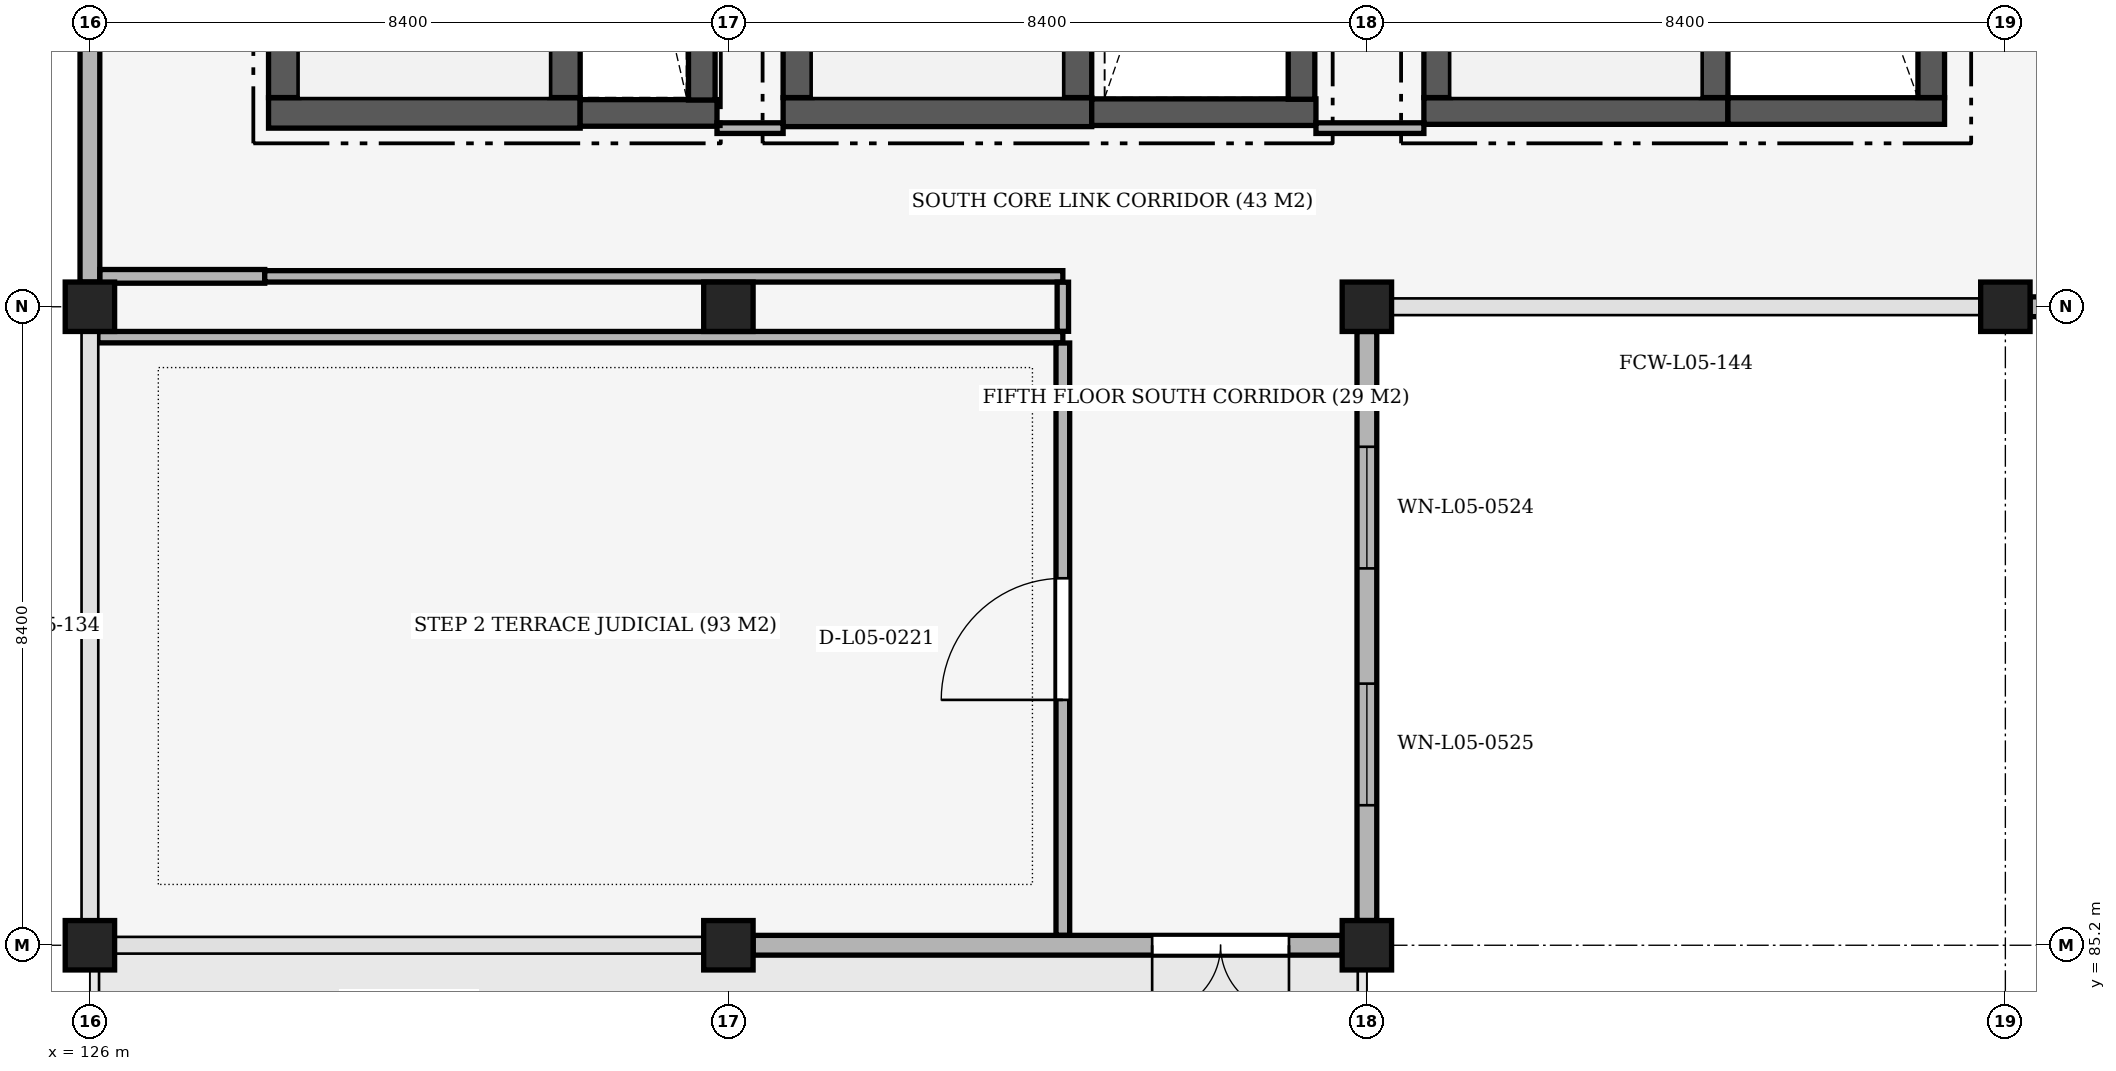
"""IFC4 building model, lengths in metres.
Left out: names, types, materials, properties, quantities, classifications, styles, units other than length and angle.
Written with IfcOpenShell. Run it as: python <this file> out.ifc"""

import sys

from ifc_helpers import new_model, si_unit, direction, frame, frame_2d, origin, origin_2d, place, context, subcontext, project, spatial, rectangle, extrude, element, fill, save


model = new_model("IFC4")
c1 = context("Model", 3, precision=1e-05, world=origin(), true_north=direction((0.0, 1.0)))
c2 = subcontext(c1, "Body", "Model", "MODEL_VIEW")
j1 = project(units=[si_unit("LENGTHUNIT", "METRE"), si_unit("PLANEANGLEUNIT", "RADIAN")], contexts=[c1])
p1 = place(None, origin())
s1 = spatial("IfcSite", under=j1, at=p1, CompositionType="ELEMENT")
p2 = place(p1, origin())
s2 = spatial("IfcBuilding", under=s1, at=p2, CompositionType="ELEMENT")
p3 = place(p2, frame((0.0, 0.0, 25.2)))
s3 = spatial("IfcBuildingStorey", under=s2, at=p3, CompositionType="ELEMENT", Elevation=25.2)
for number, where, z_axis, x_axis in (
    (1, (126.0, 85.2, 0.0), (0.0, 0.0, 1.0), (1.0, 0.0, 0.0)),
    (2, (126.0, 93.6, 0.0), (0.0, 0.0, 1.0), (1.0, 0.0, 0.0)),
    (3, (134.4, 85.2, 0.0), (0.0, 0.0, 1.0), (1.0, 0.0, 0.0)),
    (4, (134.4, 93.6, 0.0), (0.0, 0.0, 1.0), (1.0, 0.0, 0.0)),
    (5, (142.8, 85.2, 0.0), (0.0, 0.0, 1.0), (1.0, 0.0, 0.0)),
    (6, (142.8, 93.6, 0.0), (0.0, 0.0, 1.0), (1.0, 0.0, 0.0)),
    (7, (151.2, 93.6, 0.0), (0.0, 0.0, 1.0), (1.0, 0.0, 0.0)),
):
    element("IfcColumn", number, at=place(p3, frame(where, z_axis=z_axis, x_axis=x_axis)), inside=s3, PredefinedType="COLUMN", context=c2, shape_type="SweptSolid", body=[
        extrude(rectangle(XDim=0.65, YDim=0.65, at=origin_2d()), origin(), (0.0, 0.0, 1.0), 4.2),
    ])
p4 = place(p3, frame((142.475, 85.2, 0.0), z_axis=(0.0, 0.0, 1.0), x_axis=(-1.0, 0.0, 0.0)))
e8 = element("IfcWall", 8, at=p4, inside=s3, PredefinedType="SOLIDWALL", context=c2, shape_type="SweptSolid", body=[
    extrude(rectangle(XDim=7.75, YDim=0.26, at=frame_2d((3.875, 0.0))), origin(), (0.0, 0.0, 1.0), 3.25),
])
p5 = place(p4, frame((0.7, 0.0, 0.0)))
e9 = element("IfcOpeningElement", 9, at=p5, cuts=e8, PredefinedType="OPENING", context=c2, shape_type="SweptSolid", body=[
    extrude(rectangle(XDim=1.8, YDim=2.2, at=frame_2d((0.9, 1.1))), frame((0.0, 0.145, 0.0), z_axis=(0.0, -1.0, 0.0), x_axis=(1.0, 0.0, 0.0)), (0.0, 0.0, 1.0), 0.29),
])
p6 = place(p3, frame((126.0, 93.925, 0.0), z_axis=(0.0, 0.0, 1.0), x_axis=(0.0, 1.0, 0.0)))
e10 = element("IfcWall", 10, at=p6, inside=s3, PredefinedType="SOLIDWALL", context=c2, shape_type="SweptSolid", body=[
    extrude(rectangle(XDim=5.325, YDim=0.26, at=frame_2d((2.663, 0.0))), origin(), (0.0, 0.0, 1.0), 3.4),
])
p7 = place(p3, frame((156.275, 93.6, 0.0), z_axis=(0.0, 0.0, 1.0), x_axis=(-1.0, 0.0, 0.0)))
e11 = element("IfcWall", 11, at=p7, inside=s3, PredefinedType="SOLIDWALL", context=c2, shape_type="SweptSolid", body=[
    extrude(rectangle(XDim=4.75, YDim=0.26, at=frame_2d((2.375, 0.0))), origin(), (0.0, 0.0, 1.0), 3.35),
])
p8 = place(p3, frame((142.8, 93.275, 0.0), z_axis=(0.0, 0.0, 1.0), x_axis=(0.0, -1.0, 0.0)))
e12 = element("IfcWall", 12, at=p8, inside=s3, PredefinedType="SOLIDWALL", context=c2, shape_type="SweptSolid", body=[
    extrude(rectangle(XDim=7.75, YDim=0.26, at=frame_2d((3.875, 0.0))), origin(), (0.0, 0.0, 1.0), 3.25),
])
p9 = place(p8, frame((1.517, 0.0, 1.05)))
e13 = element("IfcOpeningElement", 13, at=p9, cuts=e12, PredefinedType="OPENING", context=c2, shape_type="SweptSolid", body=[
    extrude(rectangle(XDim=1.6, YDim=1.8, at=frame_2d((0.8, 0.9))), frame((0.0, 0.145, 0.0), z_axis=(0.0, -1.0, 0.0), x_axis=(1.0, 0.0, 0.0)), (0.0, 0.0, 1.0), 0.29),
])
p10 = place(p8, frame((4.633, 0.0, 1.05)))
e14 = element("IfcOpeningElement", 14, at=p10, cuts=e12, PredefinedType="OPENING", context=c2, shape_type="SweptSolid", body=[
    extrude(rectangle(XDim=1.6, YDim=1.8, at=frame_2d((0.8, 0.9))), frame((0.0, 0.145, 0.0), z_axis=(0.0, -1.0, 0.0), x_axis=(1.0, 0.0, 0.0)), (0.0, 0.0, 1.0), 0.29),
])
p11 = place(p3, frame((128.35, 96.15, 0.0), z_axis=(0.0, 0.0, 1.0), x_axis=(1.0, 0.0, 0.0)))
e15 = element("IfcWall", 15, at=p11, inside=s3, PredefinedType="SHEAR", context=c2, shape_type="SweptSolid", body=[
    extrude(rectangle(XDim=4.1, YDim=0.4, at=frame_2d((2.05, 0.0))), origin(), (0.0, 0.0, 1.0), 3.95),
])
for number, where, z_axis, x_axis in (
    (16, (128.55, 96.352, 0.0), (0.0, 0.0, 1.0), (0.0, 1.0, 0.0)),
    (17, (132.25, 96.352, 0.0), (0.0, 0.0, 1.0), (0.0, 1.0, 0.0)),
):
    element("IfcWall", number, at=place(p3, frame(where, z_axis=z_axis, x_axis=x_axis)), inside=s3, PredefinedType="SHEAR", context=c2, shape_type="SweptSolid", body=[
        extrude(rectangle(XDim=6.896, YDim=0.4, at=frame_2d((3.448, 0.0))), origin(), (0.0, 0.0, 1.0), 3.95),
    ])
p12 = place(p3, frame((132.45, 96.15, 0.0), z_axis=(0.0, 0.0, 1.0), x_axis=(1.0, 0.0, 0.0)))
e18 = element("IfcWall", 18, at=p12, inside=s3, PredefinedType="SHEAR", context=c2, shape_type="SweptSolid", body=[
    extrude(rectangle(XDim=1.8, YDim=0.35, at=frame_2d((0.9, 0.0))), origin(), (0.0, 0.0, 1.0), 3.95),
])
p13 = place(p3, frame((134.05, 96.32, 0.0), z_axis=(0.0, 0.0, 1.0), x_axis=(0.0, 1.0, 0.0)))
e19 = element("IfcWall", 19, at=p13, inside=s3, PredefinedType="SHEAR", context=c2, shape_type="SweptSolid", body=[
    extrude(rectangle(XDim=7.187, YDim=0.35, at=frame_2d((3.594, 0.0))), origin(), (0.0, 0.0, 1.0), 3.95),
])
p14 = place(p3, frame((135.12, 96.16, 0.0), z_axis=(0.0, 0.0, 1.0), x_axis=(1.0, 0.0, 0.0)))
e20 = element("IfcWall", 20, at=p14, inside=s3, PredefinedType="SHEAR", context=c2, shape_type="SweptSolid", body=[
    extrude(rectangle(XDim=4.06, YDim=0.38, at=frame_2d((2.03, 0.0))), origin(), (0.0, 0.0, 1.0), 3.95),
])
for number, where, z_axis, x_axis in (
    (21, (135.31, 96.352, 0.0), (0.0, 0.0, 1.0), (0.0, 1.0, 0.0)),
    (22, (138.99, 96.352, 0.0), (0.0, 0.0, 1.0), (0.0, 1.0, 0.0)),
):
    element("IfcWall", number, at=place(p3, frame(where, z_axis=z_axis, x_axis=x_axis)), inside=s3, PredefinedType="SHEAR", context=c2, shape_type="SweptSolid", body=[
        extrude(rectangle(XDim=6.896, YDim=0.38, at=frame_2d((3.448, 0.0))), origin(), (0.0, 0.0, 1.0), 3.95),
    ])
p15 = place(p3, frame((139.18, 96.16, 0.0), z_axis=(0.0, 0.0, 1.0), x_axis=(1.0, 0.0, 0.0)))
e23 = element("IfcWall", 23, at=p15, inside=s3, PredefinedType="SHEAR", context=c2, shape_type="SweptSolid", body=[
    extrude(rectangle(XDim=2.95, YDim=0.35, at=frame_2d((1.475, 0.0))), origin(), (0.0, 0.0, 1.0), 3.95),
])
p16 = place(p3, frame((141.94, 96.33, 0.0), z_axis=(0.0, 0.0, 1.0), x_axis=(0.0, 1.0, 0.0)))
e24 = element("IfcWall", 24, at=p16, inside=s3, PredefinedType="SHEAR", context=c2, shape_type="SweptSolid", body=[
    extrude(rectangle(XDim=7.177, YDim=0.35, at=frame_2d((3.588, 0.0))), origin(), (0.0, 0.0, 1.0), 3.95),
])
p17 = place(p3, frame((143.55, 96.175, 0.0), z_axis=(0.0, 0.0, 1.0), x_axis=(1.0, 0.0, 0.0)))
e25 = element("IfcWall", 25, at=p17, inside=s3, PredefinedType="SHEAR", context=c2, shape_type="SweptSolid", body=[
    extrude(rectangle(XDim=4.0, YDim=0.35, at=frame_2d((2.0, 0.0))), origin(), (0.0, 0.0, 1.0), 3.95),
])
for number, where, z_axis, x_axis in (
    (26, (143.725, 96.352, 0.0), (0.0, 0.0, 1.0), (0.0, 1.0, 0.0)),
    (27, (147.375, 96.352, 0.0), (0.0, 0.0, 1.0), (0.0, 1.0, 0.0)),
):
    element("IfcWall", number, at=place(p3, frame(where, z_axis=z_axis, x_axis=x_axis)), inside=s3, PredefinedType="SHEAR", context=c2, shape_type="SweptSolid", body=[
        extrude(rectangle(XDim=6.896, YDim=0.35, at=frame_2d((3.448, 0.0))), origin(), (0.0, 0.0, 1.0), 3.95),
    ])
p18 = place(p3, frame((147.55, 96.175, 0.0), z_axis=(0.0, 0.0, 1.0), x_axis=(1.0, 0.0, 0.0)))
e28 = element("IfcWall", 28, at=p18, inside=s3, PredefinedType="SHEAR", context=c2, shape_type="SweptSolid", body=[
    extrude(rectangle(XDim=2.85, YDim=0.35, at=frame_2d((1.425, 0.0))), origin(), (0.0, 0.0, 1.0), 3.95),
])
p19 = place(p3, frame((150.225, 96.352, 0.0), z_axis=(0.0, 0.0, 1.0), x_axis=(0.0, 1.0, 0.0)))
e29 = element("IfcWall", 29, at=p19, inside=s3, PredefinedType="SHEAR", context=c2, shape_type="SweptSolid", body=[
    extrude(rectangle(XDim=7.155, YDim=0.35, at=frame_2d((3.578, 0.0))), origin(), (0.0, 0.0, 1.0), 3.95),
])
p20 = place(p3, frame((126.105, 93.2, 0.0), z_axis=(0.0, 0.0, 1.0), x_axis=(1.0, 0.0, 0.0)))
e30 = element("IfcWall", 30, at=p20, inside=s3, PredefinedType="PARTITIONING", context=c2, shape_type="SweptSolid", body=[
    extrude(rectangle(XDim=12.695, YDim=0.15, at=frame_2d((6.348, 0.0))), origin(), (0.0, 0.0, 1.0), 3.25),
])
p21 = place(p3, frame((126.132, 94.0, 0.0), z_axis=(0.0, 0.0, 1.0), x_axis=(1.0, 0.0, 0.0)))
e31 = element("IfcWall", 31, at=p21, inside=s3, PredefinedType="PARTITIONING", context=c2, shape_type="SweptSolid", body=[
    extrude(rectangle(XDim=2.168, YDim=0.18, at=frame_2d((1.084, 0.0))), origin(), (0.0, 0.0, 1.0), 3.4),
])
p22 = place(p3, frame((128.3, 94.0, 0.0), z_axis=(0.0, 0.0, 1.0), x_axis=(1.0, 0.0, 0.0)))
e32 = element("IfcWall", 32, at=p22, inside=s3, PredefinedType="PARTITIONING", context=c2, shape_type="SweptSolid", body=[
    extrude(rectangle(XDim=10.5, YDim=0.15, at=frame_2d((5.25, 0.0))), origin(), (0.0, 0.0, 1.0), 3.4),
])
p23 = place(p3, frame((134.25, 95.95, 0.0), z_axis=(0.0, 0.0, 1.0), x_axis=(1.0, 0.0, 0.0)))
e33 = element("IfcWall", 33, at=p23, inside=s3, PredefinedType="PARTITIONING", context=c2, shape_type="SweptSolid", body=[
    extrude(rectangle(XDim=0.87, YDim=0.14, at=frame_2d((0.435, 0.0))), origin(), (0.0, 0.0, 1.0), 3.4),
])
p24 = place(p3, frame((142.13, 95.95, 0.0), z_axis=(0.0, 0.0, 1.0), x_axis=(1.0, 0.0, 0.0)))
e34 = element("IfcWall", 34, at=p24, inside=s3, PredefinedType="PARTITIONING", context=c2, shape_type="SweptSolid", body=[
    extrude(rectangle(XDim=1.42, YDim=0.14, at=frame_2d((0.71, 0.0))), origin(), (0.0, 0.0, 1.0), 3.4),
])
p25 = place(p3, frame((138.8, 85.332, 0.0), z_axis=(0.0, 0.0, 1.0), x_axis=(0.0, 1.0, 0.0)))
e35 = element("IfcWall", 35, at=p25, inside=s3, PredefinedType="PARTITIONING", context=c2, shape_type="SweptSolid", body=[
    extrude(rectangle(XDim=7.791, YDim=0.18, at=frame_2d((3.896, 0.0))), origin(), (0.0, 0.0, 1.0), 3.25),
])
p26 = place(p25, frame((3.096, 0.0, 0.0)))
e36 = element("IfcOpeningElement", 36, at=p26, cuts=e35, PredefinedType="OPENING", context=c2, shape_type="SweptSolid", body=[
    extrude(rectangle(XDim=1.6, YDim=2.3, at=frame_2d((0.8, 1.15))), frame((0.0, 0.105, 0.0), z_axis=(0.0, -1.0, 0.0), x_axis=(1.0, 0.0, 0.0)), (0.0, 0.0, 1.0), 0.21),
])
p27 = place(p3, frame((138.8, 93.277, 0.0), z_axis=(0.0, 0.0, 1.0), x_axis=(0.0, 1.0, 0.0)))
e37 = element("IfcWall", 37, at=p27, inside=s3, PredefinedType="PARTITIONING", context=c2, shape_type="SweptSolid", body=[
    extrude(rectangle(XDim=0.646, YDim=0.15, at=frame_2d((0.323, 0.0))), origin(), (0.0, 0.0, 1.0), 3.25),
])
p28 = place(p5, origin())
e38 = element("IfcDoor", 38, at=p28, inside=s3, OperationType="DOUBLE_DOOR_SINGLE_SWING", PredefinedType="DOOR", context=c2, shape_type="SweptSolid", body=[
    extrude(rectangle(XDim=1.8, YDim=2.2, at=frame_2d((0.9, 1.1))), frame((0.0, 0.025, 0.0), z_axis=(0.0, -1.0, 0.0), x_axis=(1.0, 0.0, 0.0)), (0.0, 0.0, 1.0), 0.05),
])
fill(e9, e38)
p29 = place(p9, origin())
e39 = element("IfcWindow", 39, at=p29, inside=s3, PartitioningType="SINGLE_PANEL", PredefinedType="WINDOW", context=c2, shape_type="SweptSolid", body=[
    extrude(rectangle(XDim=1.6, YDim=1.8, at=frame_2d((0.8, 0.9))), frame((0.0, 0.03, 0.0), z_axis=(0.0, -1.0, 0.0), x_axis=(1.0, 0.0, 0.0)), (0.0, 0.0, 1.0), 0.06),
])
fill(e13, e39)
p30 = place(p10, origin())
e40 = element("IfcWindow", 40, at=p30, inside=s3, PartitioningType="SINGLE_PANEL", PredefinedType="WINDOW", context=c2, shape_type="SweptSolid", body=[
    extrude(rectangle(XDim=1.6, YDim=1.8, at=frame_2d((0.8, 0.9))), frame((0.0, 0.03, 0.0), z_axis=(0.0, -1.0, 0.0), x_axis=(1.0, 0.0, 0.0)), (0.0, 0.0, 1.0), 0.06),
])
fill(e14, e40)
p31 = place(p26, origin())
e41 = element("IfcDoor", 41, at=p31, inside=s3, OperationType="SINGLE_SWING_LEFT", PredefinedType="DOOR", context=c2, shape_type="SweptSolid", body=[
    extrude(rectangle(XDim=1.6, YDim=2.3, at=frame_2d((0.8, 1.15))), frame((0.0, 0.025, 0.0), z_axis=(0.0, -1.0, 0.0), x_axis=(1.0, 0.0, 0.0)), (0.0, 0.0, 1.0), 0.05),
])
fill(e36, e41)
save(model, sys.argv[1])
